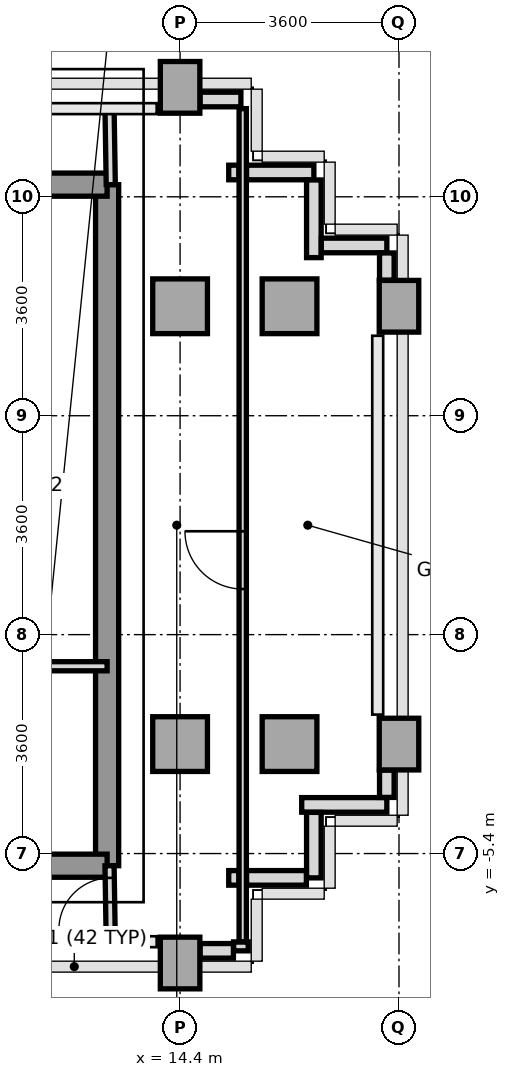
"""IFC4 building model, lengths in metres.
Left out: names, types, materials, properties, quantities, classifications, styles, units other than length and angle.
Written with IfcOpenShell. Run it as: python <this file> out.ifc"""

import sys

from ifc_helpers import new_model, si_unit, direction, frame, frame_2d, origin, origin_2d, place, context, subcontext, project, spatial, rectangle, extrude, source, transform, mapped, element, fill, save


model = new_model("IFC4")
c1 = context("Model", 3, precision=1e-05, world=origin(), true_north=direction((0.0, 1.0)))
c2 = subcontext(c1, "Body", "Model", "MODEL_VIEW")
j1 = project(units=[si_unit("LENGTHUNIT", "METRE"), si_unit("PLANEANGLEUNIT", "RADIAN")], contexts=[c1])
p1 = place(None, origin())
s1 = spatial("IfcSite", under=j1, at=p1, CompositionType="ELEMENT")
p2 = place(p1, origin())
s2 = spatial("IfcBuilding", under=s1, at=p2, CompositionType="ELEMENT")
p3 = place(p2, frame((0.0, 0.0, 167.2)))
s3 = spatial("IfcBuildingStorey", under=s2, at=p3, CompositionType="ELEMENT", Elevation=167.2)
m1 = source(origin(), c2, "Body", "SweptSolid", [
    extrude(rectangle(XDim=0.65, YDim=0.85, at=origin_2d()), origin(), (0.0, 0.0, 1.0), 3.2),
])
p4 = place(p3, frame((14.4, -7.2, 0.0), z_axis=(0.0, 0.0, 1.0), x_axis=(1.0, 0.0, 0.0)))
e1 = element("IfcColumn", 1, at=p4, inside=s3, PredefinedType="COLUMN", context=c2, shape_type="MappedRepresentation", body=[
    mapped(m1, transform((0.0, 0.0, 0.0), x_axis=(1.0, 0.0, 0.0), y_axis=(0.0, 1.0, 0.0), z_axis=(0.0, 0.0, 1.0), scale=1.0)),
])
m2 = source(origin(), c2, "Body", "SweptSolid", [
    extrude(rectangle(XDim=0.9, YDim=0.9, at=origin_2d()), origin(), (0.0, 0.0, 1.0), 3.2),
])
for number, where, z_axis, x_axis in (
    (2, (14.4, -3.6, 0.0), (0.0, 0.0, 1.0), (1.0, 0.0, 0.0)),
    (3, (14.4, 3.6, 0.0), (0.0, 0.0, 1.0), (1.0, 0.0, 0.0)),
):
    element("IfcColumn", number, at=place(p3, frame(where, z_axis=z_axis, x_axis=x_axis)), inside=s3, PredefinedType="COLUMN", context=c2, shape_type="MappedRepresentation", body=[
        mapped(m2, transform((0.0, 0.0, 0.0), x_axis=(1.0, 0.0, 0.0), y_axis=(0.0, 1.0, 0.0), z_axis=(0.0, 0.0, 1.0), scale=1.0)),
    ])
p5 = place(p3, frame((14.4, 7.2, 0.0), z_axis=(0.0, 0.0, 1.0), x_axis=(1.0, 0.0, 0.0)))
e4 = element("IfcColumn", 4, at=p5, inside=s3, PredefinedType="COLUMN", context=c2, shape_type="MappedRepresentation", body=[
    mapped(m1, transform((0.0, 0.0, 0.0), x_axis=(1.0, 0.0, 0.0), y_axis=(0.0, 1.0, 0.0), z_axis=(0.0, 0.0, 1.0), scale=1.0)),
])
for number, where, z_axis, x_axis in (
    (5, (16.2, -3.6, 0.0), (0.0, 0.0, 1.0), (1.0, 0.0, 0.0)),
    (6, (16.2, 3.6, 0.0), (0.0, 0.0, 1.0), (1.0, 0.0, 0.0)),
):
    element("IfcColumn", number, at=place(p3, frame(where, z_axis=z_axis, x_axis=x_axis)), inside=s3, PredefinedType="COLUMN", context=c2, shape_type="MappedRepresentation", body=[
        mapped(m2, transform((0.0, 0.0, 0.0), x_axis=(1.0, 0.0, 0.0), y_axis=(0.0, 1.0, 0.0), z_axis=(0.0, 0.0, 1.0), scale=1.0)),
    ])
for number, where, z_axis, x_axis in (
    (7, (18.0, -3.6, 0.0), (0.0, 0.0, 1.0), (1.0, 0.0, 0.0)),
    (8, (18.0, 3.6, 0.0), (0.0, 0.0, 1.0), (1.0, 0.0, 0.0)),
):
    element("IfcColumn", number, at=place(p3, frame(where, z_axis=z_axis, x_axis=x_axis)), inside=s3, PredefinedType="COLUMN", context=c2, shape_type="MappedRepresentation", body=[
        mapped(m1, transform((0.0, 0.0, 0.0), x_axis=(1.0, 0.0, 0.0), y_axis=(0.0, 1.0, 0.0), z_axis=(0.0, 0.0, 1.0), scale=1.0)),
    ])
p6 = place(p3, frame((17.8, -4.6, 0.0), z_axis=(0.0, 0.0, 1.0), x_axis=(-1.0, 0.0, 0.0)))
e9 = element("IfcWall", 9, at=p6, inside=s3, PredefinedType="PARAPET", context=c2, shape_type="SweptSolid", body=[
    extrude(rectangle(XDim=1.4, YDim=0.24, at=frame_2d((0.7, 0.0))), origin(), (0.0, 0.0, 1.0), 1.15),
])
p7 = place(p3, frame((16.6, -4.723, 0.0), z_axis=(0.0, 0.0, 1.0), x_axis=(0.0, -1.0, 0.0)))
e10 = element("IfcWall", 10, at=p7, inside=s3, PredefinedType="PARAPET", context=c2, shape_type="SweptSolid", body=[
    extrude(rectangle(XDim=1.077, YDim=0.24, at=frame_2d((0.539, 0.0))), origin(), (0.0, 0.0, 1.0), 1.15),
])
p8 = place(p3, frame((16.477, -5.8, 0.0), z_axis=(0.0, 0.0, 1.0), x_axis=(-1.0, 0.0, 0.0)))
e11 = element("IfcWall", 11, at=p8, inside=s3, PredefinedType="PARAPET", context=c2, shape_type="SweptSolid", body=[
    extrude(rectangle(XDim=0.984, YDim=0.24, at=frame_2d((0.492, 0.0))), origin(), (0.0, 0.0, 1.0), 1.15),
])
p9 = place(p3, frame((15.367, -5.8, 0.0), z_axis=(0.0, 0.0, 1.0), x_axis=(-1.0, 0.0, 0.0)))
e12 = element("IfcWall", 12, at=p9, inside=s3, PredefinedType="PARAPET", context=c2, shape_type="SweptSolid", body=[
    extrude(rectangle(XDim=0.167, YDim=0.24, at=frame_2d((0.083, 0.0))), origin(), (0.0, 0.0, 1.0), 1.15),
])
p10 = place(p3, frame((15.4, -6.853, 0.0), z_axis=(0.0, 0.0, 1.0), x_axis=(0.0, -1.0, 0.0)))
e13 = element("IfcWall", 13, at=p10, inside=s3, PredefinedType="PARAPET", context=c2, shape_type="SweptSolid", body=[
    extrude(rectangle(XDim=0.147, YDim=0.24, at=frame_2d((0.073, 0.0))), origin(), (0.0, 0.0, 1.0), 1.15),
])
p11 = place(p3, frame((15.277, -7.0, 0.0), z_axis=(0.0, 0.0, 1.0), x_axis=(-1.0, 0.0, 0.0)))
e14 = element("IfcWall", 14, at=p11, inside=s3, PredefinedType="PARAPET", context=c2, shape_type="SweptSolid", body=[
    extrude(rectangle(XDim=0.549, YDim=0.24, at=frame_2d((0.274, 0.0))), origin(), (0.0, 0.0, 1.0), 1.15),
])
p12 = place(p3, frame((14.728, 7.0, 0.0), z_axis=(0.0, 0.0, 1.0), x_axis=(1.0, 0.0, 0.0)))
e15 = element("IfcWall", 15, at=p12, inside=s3, PredefinedType="PARAPET", context=c2, shape_type="SweptSolid", body=[
    extrude(rectangle(XDim=0.672, YDim=0.24, at=frame_2d((0.336, 0.0))), origin(), (0.0, 0.0, 1.0), 1.15),
])
p13 = place(p3, frame((15.2, 5.8, 0.0), z_axis=(0.0, 0.0, 1.0), x_axis=(1.0, 0.0, 0.0)))
e16 = element("IfcWall", 16, at=p13, inside=s3, PredefinedType="PARAPET", context=c2, shape_type="SweptSolid", body=[
    extrude(rectangle(XDim=0.167, YDim=0.24, at=frame_2d((0.083, 0.0))), origin(), (0.0, 0.0, 1.0), 1.15),
])
p14 = place(p3, frame((15.493, 5.8, 0.0), z_axis=(0.0, 0.0, 1.0), x_axis=(1.0, 0.0, 0.0)))
e17 = element("IfcWall", 17, at=p14, inside=s3, PredefinedType="PARAPET", context=c2, shape_type="SweptSolid", body=[
    extrude(rectangle(XDim=1.107, YDim=0.24, at=frame_2d((0.554, 0.0))), origin(), (0.0, 0.0, 1.0), 1.15),
])
p15 = place(p3, frame((16.6, 5.677, 0.0), z_axis=(0.0, 0.0, 1.0), x_axis=(0.0, -1.0, 0.0)))
e18 = element("IfcWall", 18, at=p15, inside=s3, PredefinedType="PARAPET", context=c2, shape_type="SweptSolid", body=[
    extrude(rectangle(XDim=1.277, YDim=0.24, at=frame_2d((0.639, 0.0))), origin(), (0.0, 0.0, 1.0), 1.15),
])
p16 = place(p3, frame((16.723, 4.6, 0.0), z_axis=(0.0, 0.0, 1.0), x_axis=(1.0, 0.0, 0.0)))
e19 = element("IfcWall", 19, at=p16, inside=s3, PredefinedType="PARAPET", context=c2, shape_type="SweptSolid", body=[
    extrude(rectangle(XDim=1.077, YDim=0.24, at=frame_2d((0.539, 0.0))), origin(), (0.0, 0.0, 1.0), 1.15),
])
for number, where, z_axis, x_axis in (
    (20, (17.8, 4.477, 0.0), (0.0, 0.0, 1.0), (0.0, -1.0, 0.0)),
    (21, (17.8, -4.028, 0.0), (0.0, 0.0, 1.0), (0.0, -1.0, 0.0)),
):
    element("IfcWall", number, at=place(p3, frame(where, z_axis=z_axis, x_axis=x_axis)), inside=s3, PredefinedType="PARAPET", context=c2, shape_type="SweptSolid", body=[
        extrude(rectangle(XDim=0.449, YDim=0.24, at=frame_2d((0.225, 0.0))), origin(), (0.0, 0.0, 1.0), 1.15),
    ])
p17 = place(p3, frame((13.2, -5.6, 0.0), z_axis=(0.0, 0.0, 1.0), x_axis=(0.0, 1.0, 0.0)))
e22 = element("IfcWall", 22, at=p17, inside=s3, PredefinedType="SHEAR", context=c2, shape_type="SweptSolid", body=[
    extrude(rectangle(XDim=11.2, YDim=0.38, at=frame_2d((5.6, 0.0))), origin(), (0.0, 0.0, 1.0), 3.2),
])
p18 = place(p3, frame((11.356, 5.6, 0.0), z_axis=(0.0, 0.0, 1.0), x_axis=(1.0, 0.0, 0.0)))
e23 = element("IfcWall", 23, at=p18, inside=s3, PredefinedType="SHEAR", context=c2, shape_type="SweptSolid", body=[
    extrude(rectangle(XDim=1.844, YDim=0.38, at=frame_2d((0.922, 0.0))), origin(), (0.0, 0.0, 1.0), 3.2),
])
p19 = place(p3, frame((5.4, -5.6, 0.0), z_axis=(0.0, 0.0, 1.0), x_axis=(1.0, 0.0, 0.0)))
e24 = element("IfcWall", 24, at=p19, inside=s3, PredefinedType="SHEAR", context=c2, shape_type="SweptSolid", body=[
    extrude(rectangle(XDim=7.8, YDim=0.38, at=frame_2d((3.9, 0.0))), origin(), (0.0, 0.0, 1.0), 3.2),
])
p20 = place(p19, frame((3.0, 0.0, 0.0)))
e25 = element("IfcOpeningElement", 25, at=p20, cuts=e24, PredefinedType="OPENING", context=c2, shape_type="SweptSolid", body=[
    extrude(rectangle(XDim=1.2, YDim=2.2, at=frame_2d((0.6, 1.1))), frame((0.0, 0.2, 0.0), z_axis=(0.0, -1.0, 0.0), x_axis=(1.0, 0.0, 0.0)), (0.0, 0.0, 1.0), 0.4),
])
p21 = place(p19, frame((5.85, 0.0, 0.0)))
e26 = element("IfcOpeningElement", 26, at=p21, cuts=e24, PredefinedType="OPENING", context=c2, shape_type="SweptSolid", body=[
    extrude(rectangle(XDim=0.8, YDim=2.1, at=frame_2d((0.4, 1.05))), frame((0.0, 0.2, 0.0), z_axis=(0.0, -1.0, 0.0), x_axis=(1.0, 0.0, 0.0)), (0.0, 0.0, 1.0), 0.4),
])
p22 = place(p3, frame((11.02, -2.32, 0.0), z_axis=(0.0, 0.0, 1.0), x_axis=(1.0, 0.0, 0.0)))
e27 = element("IfcWall", 27, at=p22, inside=s3, PredefinedType="PARTITIONING", context=c2, shape_type="SweptSolid", body=[
    extrude(rectangle(XDim=2.18, YDim=0.15, at=frame_2d((1.09, 0.0))), origin(), (0.0, 0.0, 1.0), 3.2),
])
p23 = place(p3, frame((13.26, 5.6, 0.0), z_axis=(0.0, 0.0, 1.0), x_axis=(-0.016013571389, 0.999871774545, 0.0)))
e28 = element("IfcWall", 28, at=p23, inside=s3, PredefinedType="PARTITIONING", context=c2, shape_type="SweptSolid", body=[
    extrude(rectangle(XDim=1.25, YDim=0.15, at=frame_2d((0.625, 0.0))), origin(), (0.0, 0.0, 1.0), 3.2),
])
p24 = place(p3, frame((13.26, -6.85, 0.0), z_axis=(0.0, 0.0, 1.0), x_axis=(-0.016013571389, 0.999871774545, 0.0)))
e29 = element("IfcWall", 29, at=p24, inside=s3, PredefinedType="PARTITIONING", context=c2, shape_type="SweptSolid", body=[
    extrude(rectangle(XDim=1.25, YDim=0.15, at=frame_2d((0.625, 0.0))), origin(), (0.0, 0.0, 1.0), 3.2),
])
p25 = place(p24, frame((0.2, 0.0, 0.0)))
e30 = element("IfcOpeningElement", 30, at=p25, cuts=e29, PredefinedType="OPENING", context=c2, shape_type="SweptSolid", body=[
    extrude(rectangle(XDim=0.85, YDim=2.1, at=frame_2d((0.425, 1.05))), frame((0.0, 0.085, 0.0), z_axis=(0.0, -1.0, 0.0), x_axis=(1.0, 0.0, 0.0)), (0.0, 0.0, 1.0), 0.17),
])
p26 = place(p3, frame((15.43, -6.85, 0.0), z_axis=(0.0, 0.0, 1.0), x_axis=(0.0, 1.0, 0.0)))
e31 = element("IfcWall", 31, at=p26, inside=s3, PredefinedType="PARTITIONING", context=c2, shape_type="SweptSolid", body=[
    extrude(rectangle(XDim=13.7, YDim=0.12, at=frame_2d((6.85, 0.0))), origin(), (0.0, 0.0, 1.0), 3.2),
])
p27 = place(p26, frame((5.8, 0.0, 0.0)))
e32 = element("IfcOpeningElement", 32, at=p27, cuts=e31, PredefinedType="OPENING", context=c2, shape_type="SweptSolid", body=[
    extrude(rectangle(XDim=0.95, YDim=2.15, at=frame_2d((0.475, 1.075))), frame((0.0, 0.07, 0.0), z_axis=(0.0, -1.0, 0.0), x_axis=(1.0, 0.0, 0.0)), (0.0, 0.0, 1.0), 0.14),
])
m3 = source(origin(), c2, "Body", "SweptSolid", [
    extrude(rectangle(XDim=0.85, YDim=2.1, at=frame_2d((0.425, 1.05))), frame((0.0, 0.025, 0.0), z_axis=(0.0, -1.0, 0.0), x_axis=(1.0, 0.0, 0.0)), (0.0, 0.0, 1.0), 0.05),
])
p28 = place(p25, origin())
e33 = element("IfcDoor", 33, at=p28, inside=s3, OperationType="SINGLE_SWING_LEFT", PredefinedType="DOOR", context=c2, shape_type="MappedRepresentation", body=[
    mapped(m3, transform((0.0, 0.0, 0.0), x_axis=(1.0, 0.0, 0.0), y_axis=(0.0, 1.0, 0.0), z_axis=(0.0, 0.0, 1.0), scale=1.0)),
])
fill(e30, e33)
m4 = source(origin(), c2, "Body", "SweptSolid", [
    extrude(rectangle(XDim=0.95, YDim=2.15, at=frame_2d((0.475, 1.075))), frame((0.0, 0.025, 0.0), z_axis=(0.0, -1.0, 0.0), x_axis=(1.0, 0.0, 0.0)), (0.0, 0.0, 1.0), 0.05),
])
p29 = place(p27, origin())
e34 = element("IfcDoor", 34, at=p29, inside=s3, OperationType="SINGLE_SWING_RIGHT", PredefinedType="DOOR", context=c2, shape_type="MappedRepresentation", body=[
    mapped(m4, transform((0.0, 0.0, 0.0), x_axis=(1.0, 0.0, 0.0), y_axis=(0.0, 1.0, 0.0), z_axis=(0.0, 0.0, 1.0), scale=1.0)),
])
fill(e32, e34)
save(model, sys.argv[1])
